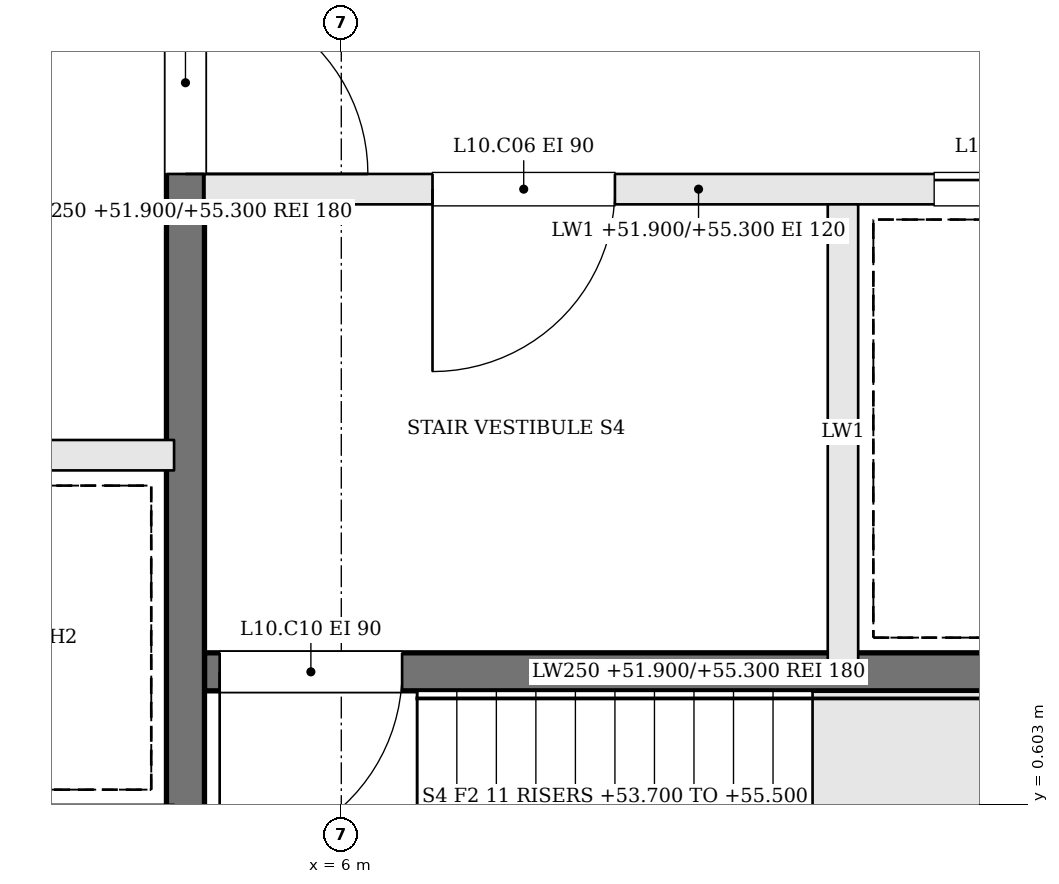
"""IFC4 building model, lengths in metres.
Left out: names, types, materials, properties, quantities, classifications, styles, units other than length and angle.
Written with IfcOpenShell. Run it as: python <this file> out.ifc"""

import sys

from ifc_helpers import new_model, si_unit, direction, frame, frame_2d, origin, place, context, subcontext, project, spatial, rectangle, extrude, element, fill, save


model = new_model("IFC4")
c1 = context("Model", 3, precision=1e-05, world=origin(), true_north=direction((0.0, 1.0)))
c2 = subcontext(c1, "Body", "Model", "MODEL_VIEW")
j1 = project(units=[si_unit("LENGTHUNIT", "METRE"), si_unit("PLANEANGLEUNIT", "RADIAN")], contexts=[c1])
p1 = place(None, origin())
s1 = spatial("IfcSite", under=j1, at=p1, CompositionType="ELEMENT")
p2 = place(p1, origin())
s2 = spatial("IfcBuilding", under=s1, at=p2, CompositionType="ELEMENT")
p3 = place(p2, frame((0.0, 0.0, 51.9)))
s3 = spatial("IfcBuildingStorey", under=s2, at=p3, CompositionType="ELEMENT", Elevation=51.9)
p4 = place(p3, frame((11.6, 4.65, 0.0), z_axis=(0.0, 0.0, 1.0), x_axis=(-1.0, 0.0, 0.0)))
e1 = element("IfcWall", 1, at=p4, inside=s3, PredefinedType="SOLIDWALL", context=c2, shape_type="SweptSolid", body=[
    extrude(rectangle(XDim=6.5, YDim=0.2, at=frame_2d((3.25, 0.0))), origin(), (0.0, 0.0, 1.0), 3.4),
])
p5 = place(p4, frame((3.8, 0.0, 0.0)))
e2 = element("IfcOpeningElement", 2, at=p5, cuts=e1, PredefinedType="OPENING", context=c2, shape_type="SweptSolid", body=[
    extrude(rectangle(XDim=1.2, YDim=2.1, at=frame_2d((0.6, 1.05))), frame((0.0, 0.11, 0.0), z_axis=(0.0, -1.0, 0.0), x_axis=(1.0, 0.0, 0.0)), (0.0, 0.0, 1.0), 0.22),
])
p6 = place(p4, frame((0.5, 0.0, 0.0)))
e3 = element("IfcOpeningElement", 3, at=p6, cuts=e1, PredefinedType="OPENING", context=c2, shape_type="SweptSolid", body=[
    extrude(rectangle(XDim=1.2, YDim=2.1, at=frame_2d((0.6, 1.05))), frame((0.0, 0.11, 0.0), z_axis=(0.0, -1.0, 0.0), x_axis=(1.0, 0.0, 0.0)), (0.0, 0.0, 1.0), 0.22),
])
p7 = place(p3, frame((11.6, 1.475, 0.0), z_axis=(0.0, 0.0, 1.0), x_axis=(-1.0, 0.0, 0.0)))
e4 = element("IfcWall", 4, at=p7, inside=s3, PredefinedType="SOLIDWALL", context=c2, shape_type="SweptSolid", body=[
    extrude(rectangle(XDim=6.5, YDim=0.25, at=frame_2d((3.25, 0.0))), origin(), (0.0, 0.0, 1.0), 3.4),
])
p8 = place(p7, frame((5.2, 0.0, 0.0)))
e5 = element("IfcOpeningElement", 5, at=p8, cuts=e4, PredefinedType="OPENING", context=c2, shape_type="SweptSolid", body=[
    extrude(rectangle(XDim=1.2, YDim=2.1, at=frame_2d((0.6, 1.05))), frame((0.0, 0.135, 0.0), z_axis=(0.0, -1.0, 0.0), x_axis=(1.0, 0.0, 0.0)), (0.0, 0.0, 1.0), 0.27),
])
p9 = place(p3, frame((9.3, 4.55, 0.0), z_axis=(0.0, 0.0, 1.0), x_axis=(0.0, -1.0, 0.0)))
e6 = element("IfcWall", 6, at=p9, inside=s3, PredefinedType="SOLIDWALL", context=c2, shape_type="SweptSolid", body=[
    extrude(rectangle(XDim=3.0, YDim=0.2, at=frame_2d((1.5, 0.0))), origin(), (0.0, 0.0, 1.0), 3.4),
])
p10 = place(p3, frame((4.975, 10.6, 0.0), z_axis=(0.0, 0.0, 1.0), x_axis=(0.0, -1.0, 0.0)))
e7 = element("IfcWall", 7, at=p10, inside=s3, PredefinedType="SOLIDWALL", context=c2, shape_type="SweptSolid", body=[
    extrude(rectangle(XDim=12.2, YDim=0.25, at=frame_2d((6.1, 0.0))), origin(), (0.0, 0.0, 1.0), 3.4),
])
p11 = place(p10, frame((4.65, 0.0, 0.0)))
e8 = element("IfcOpeningElement", 8, at=p11, cuts=e7, PredefinedType="OPENING", context=c2, shape_type="SweptSolid", body=[
    extrude(rectangle(XDim=1.2, YDim=2.1, at=frame_2d((0.6, 1.05))), frame((0.0, 0.135, 0.0), z_axis=(0.0, -1.0, 0.0), x_axis=(1.0, 0.0, 0.0)), (0.0, 0.0, 1.0), 0.27),
])
p12 = place(p3, frame((-4.9, 2.9, 0.0), z_axis=(0.0, 0.0, 1.0), x_axis=(1.0, 0.0, 0.0)))
e9 = element("IfcWall", 9, at=p12, inside=s3, PredefinedType="SOLIDWALL", context=c2, shape_type="SweptSolid", body=[
    extrude(rectangle(XDim=9.8, YDim=0.2, at=frame_2d((4.9, 0.0))), origin(), (0.0, 0.0, 1.0), 3.4),
])
p13 = place(p12, frame((0.675, 0.0, 0.0)))
e10 = element("IfcOpeningElement", 10, at=p13, cuts=e9, PredefinedType="OPENING", context=c2, shape_type="SweptSolid", body=[
    extrude(rectangle(XDim=1.1, YDim=2.1, at=frame_2d((0.55, 1.05))), frame((0.0, 0.11, 0.0), z_axis=(0.0, -1.0, 0.0), x_axis=(1.0, 0.0, 0.0)), (0.0, 0.0, 1.0), 0.22),
])
p14 = place(p12, frame((3.125, 0.0, 0.0)))
e11 = element("IfcOpeningElement", 11, at=p14, cuts=e9, PredefinedType="OPENING", context=c2, shape_type="SweptSolid", body=[
    extrude(rectangle(XDim=1.1, YDim=2.1, at=frame_2d((0.55, 1.05))), frame((0.0, 0.11, 0.0), z_axis=(0.0, -1.0, 0.0), x_axis=(1.0, 0.0, 0.0)), (0.0, 0.0, 1.0), 0.22),
])
p15 = place(p11, origin())
e12 = element("IfcDoor", 12, at=p15, inside=s3, OperationType="SINGLE_SWING_RIGHT", PredefinedType="DOOR", context=c2, shape_type="SweptSolid", body=[
    extrude(rectangle(XDim=1.2, YDim=2.1, at=frame_2d((0.6, 1.05))), frame((0.0, 0.025, 0.0), z_axis=(0.0, -1.0, 0.0), x_axis=(1.0, 0.0, 0.0)), (0.0, 0.0, 1.0), 0.05),
])
fill(e8, e12)
p16 = place(p5, origin())
e13 = element("IfcDoor", 13, at=p16, inside=s3, OperationType="SINGLE_SWING_RIGHT", PredefinedType="DOOR", context=c2, shape_type="SweptSolid", body=[
    extrude(rectangle(XDim=1.2, YDim=2.1, at=frame_2d((0.6, 1.05))), frame((0.0, 0.025, 0.0), z_axis=(0.0, -1.0, 0.0), x_axis=(1.0, 0.0, 0.0)), (0.0, 0.0, 1.0), 0.05),
])
fill(e2, e13)
p17 = place(p8, origin())
e14 = element("IfcDoor", 14, at=p17, inside=s3, OperationType="SINGLE_SWING_RIGHT", PredefinedType="DOOR", context=c2, shape_type="SweptSolid", body=[
    extrude(rectangle(XDim=1.2, YDim=2.1, at=frame_2d((0.6, 1.05))), frame((0.0, 0.025, 0.0), z_axis=(0.0, -1.0, 0.0), x_axis=(1.0, 0.0, 0.0)), (0.0, 0.0, 1.0), 0.05),
])
fill(e5, e14)
p18 = place(p6, origin())
e15 = element("IfcDoor", 15, at=p18, inside=s3, OperationType="SLIDING_TO_RIGHT", PredefinedType="DOOR", context=c2, shape_type="SweptSolid", body=[
    extrude(rectangle(XDim=1.2, YDim=2.1, at=frame_2d((0.6, 1.05))), frame((0.0, 0.025, 0.0), z_axis=(0.0, -1.0, 0.0), x_axis=(1.0, 0.0, 0.0)), (0.0, 0.0, 1.0), 0.05),
])
fill(e3, e15)
save(model, sys.argv[1])
